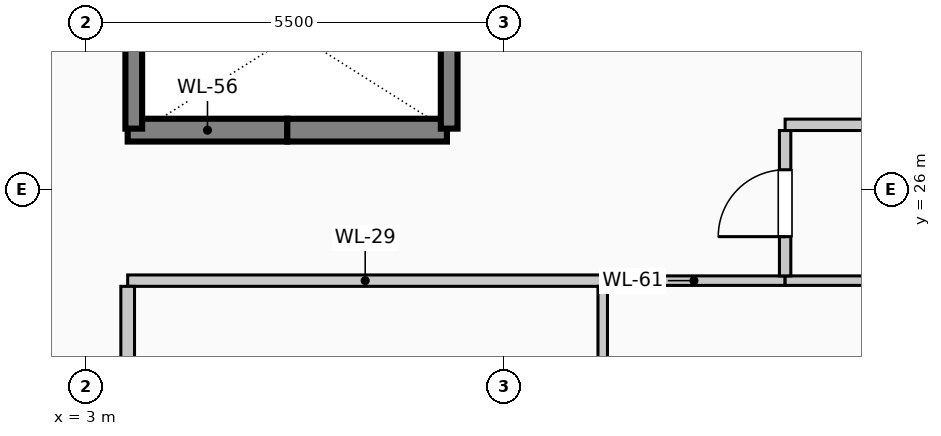
"""IFC4 building model, lengths in metres.
Left out: names, types, materials, properties, quantities, classifications, styles, units other than length and angle.
Written with IfcOpenShell. Run it as: python <this file> out.ifc"""

import sys

from ifc_helpers import new_model, si_unit, direction, frame, frame_2d, origin, place, context, subcontext, project, spatial, rectangle, extrude, element, fill, save


model = new_model("IFC4")
c1 = context("Model", 3, precision=1e-05, world=origin(), true_north=direction((0.0, 1.0)))
c2 = subcontext(c1, "Body", "Model", "MODEL_VIEW")
j1 = project(units=[si_unit("LENGTHUNIT", "METRE"), si_unit("PLANEANGLEUNIT", "RADIAN")], contexts=[c1])
p1 = place(None, origin())
s1 = spatial("IfcSite", under=j1, at=p1, CompositionType="ELEMENT")
p2 = place(p1, origin())
s2 = spatial("IfcBuilding", under=s1, at=p2, CompositionType="ELEMENT")
p3 = place(p2, frame((0.0, 0.0, 260.6)))
s3 = spatial("IfcBuildingStorey", under=s2, at=p3, CompositionType="ELEMENT", Elevation=260.6)
p4 = place(p3, frame((5.65, 26.78, 0.0), z_axis=(0.0, 0.0, 1.0), x_axis=(-1.0, 0.0, 0.0)))
e1 = element("IfcWall", 1, at=p4, inside=s3, PredefinedType="SOLIDWALL", context=c2, shape_type="SweptSolid", body=[
    extrude(rectangle(XDim=2.1, YDim=0.3, at=frame_2d((1.05, 0.0))), origin(), (0.0, 0.0, 1.0), 4.0),
])
p5 = place(p3, frame((7.75, 26.78, 0.0), z_axis=(0.0, 0.0, 1.0), x_axis=(-1.0, 0.0, 0.0)))
e2 = element("IfcWall", 2, at=p5, inside=s3, PredefinedType="SOLIDWALL", context=c2, shape_type="SweptSolid", body=[
    extrude(rectangle(XDim=2.1, YDim=0.3, at=frame_2d((1.05, 0.0))), origin(), (0.0, 0.0, 1.0), 4.0),
])
p6 = place(p3, frame((3.63, 26.8, 0.0), z_axis=(0.0, 0.0, 1.0), x_axis=(0.0, 1.0, 0.0)))
e3 = element("IfcWall", 3, at=p6, inside=s3, PredefinedType="SOLIDWALL", context=c2, shape_type="SweptSolid", body=[
    extrude(rectangle(XDim=5.55, YDim=0.22, at=frame_2d((2.775, 0.0))), origin(), (0.0, 0.0, 1.0), 4.0),
])
p7 = place(p3, frame((7.78, 26.8, 0.0), z_axis=(0.0, 0.0, 1.0), x_axis=(0.0, 1.0, 0.0)))
e4 = element("IfcWall", 4, at=p7, inside=s3, PredefinedType="SOLIDWALL", context=c2, shape_type="SweptSolid", body=[
    extrude(rectangle(XDim=2.8, YDim=0.22, at=frame_2d((1.4, 0.0))), origin(), (0.0, 0.0, 1.0), 4.0),
])
p8 = place(p3, frame((3.55, 24.8, 0.0), z_axis=(0.0, 0.0, 1.0), x_axis=(1.0, 0.0, 0.0)))
e5 = element("IfcWall", 5, at=p8, inside=s3, PredefinedType="PARTITIONING", context=c2, shape_type="SweptSolid", body=[
    extrude(rectangle(XDim=6.25, YDim=0.15, at=frame_2d((3.125, 0.0))), origin(), (0.0, 0.0, 1.0), 3.75),
])
p9 = place(p3, frame((9.8, 24.8, 0.0), z_axis=(0.0, 0.0, 1.0), x_axis=(1.0, 0.0, 0.0)))
e6 = element("IfcWall", 6, at=p9, inside=s3, PredefinedType="PARTITIONING", context=c2, shape_type="SweptSolid", body=[
    extrude(rectangle(XDim=2.4, YDim=0.125, at=frame_2d((1.2, 0.0))), origin(), (0.0, 0.0, 1.0), 3.75),
])
p10 = place(p3, frame((12.2, 24.8, 0.0), z_axis=(0.0, 0.0, 1.0), x_axis=(1.0, 0.0, 0.0)))
e7 = element("IfcWall", 7, at=p10, inside=s3, PredefinedType="PARTITIONING", context=c2, shape_type="SweptSolid", body=[
    extrude(rectangle(XDim=3.65, YDim=0.125, at=frame_2d((1.825, 0.0))), origin(), (0.0, 0.0, 1.0), 3.75),
])
p11 = place(p3, frame((12.2, 26.85, 0.0), z_axis=(0.0, 0.0, 1.0), x_axis=(1.0, 0.0, 0.0)))
e8 = element("IfcWall", 8, at=p11, inside=s3, PredefinedType="PARTITIONING", context=c2, shape_type="SweptSolid", body=[
    extrude(rectangle(XDim=8.8, YDim=0.15, at=frame_2d((4.4, 0.0))), origin(), (0.0, 0.0, 1.0), 3.75),
])
p12 = place(p3, frame((3.55, 17.39, 0.0), z_axis=(0.0, 0.0, 1.0), x_axis=(0.0, 1.0, 0.0)))
e9 = element("IfcWall", 9, at=p12, inside=s3, PredefinedType="PARTITIONING", context=c2, shape_type="SweptSolid", body=[
    extrude(rectangle(XDim=7.335, YDim=0.18, at=frame_2d((3.667, 0.0))), origin(), (0.0, 0.0, 1.0), 3.75),
])
p13 = place(p3, frame((9.8, 17.39, 0.0), z_axis=(0.0, 0.0, 1.0), x_axis=(0.0, 1.0, 0.0)))
e10 = element("IfcWall", 10, at=p13, inside=s3, PredefinedType="PARTITIONING", context=c2, shape_type="SweptSolid", body=[
    extrude(rectangle(XDim=7.335, YDim=0.125, at=frame_2d((3.667, 0.0))), origin(), (0.0, 0.0, 1.0), 3.75),
])
p14 = place(p3, frame((12.2, 24.863, 0.0), z_axis=(0.0, 0.0, 1.0), x_axis=(0.0, 1.0, 0.0)))
e11 = element("IfcWall", 11, at=p14, inside=s3, PredefinedType="PARTITIONING", context=c2, shape_type="SweptSolid", body=[
    extrude(rectangle(XDim=1.912, YDim=0.15, at=frame_2d((0.956, 0.0))), origin(), (0.0, 0.0, 1.0), 3.75),
])
p15 = place(p14, frame((0.516, 0.0, 0.0)))
e12 = element("IfcOpeningElement", 12, at=p15, cuts=e11, PredefinedType="OPENING", context=c2, shape_type="SweptSolid", body=[
    extrude(rectangle(XDim=0.88, YDim=2.1, at=frame_2d((0.44, 1.05))), frame((0.0, 0.085, 0.0), z_axis=(0.0, -1.0, 0.0), x_axis=(1.0, 0.0, 0.0)), (0.0, 0.0, 1.0), 0.17),
])
p16 = place(p15, origin())
e13 = element("IfcDoor", 13, at=p16, inside=s3, OperationType="SINGLE_SWING_LEFT", PredefinedType="DOOR", context=c2, shape_type="SweptSolid", body=[
    extrude(rectangle(XDim=0.88, YDim=2.1, at=frame_2d((0.44, 1.05))), frame((0.0, 0.025, 0.0), z_axis=(0.0, -1.0, 0.0), x_axis=(1.0, 0.0, 0.0)), (0.0, 0.0, 1.0), 0.05),
])
fill(e12, e13)
save(model, sys.argv[1])
